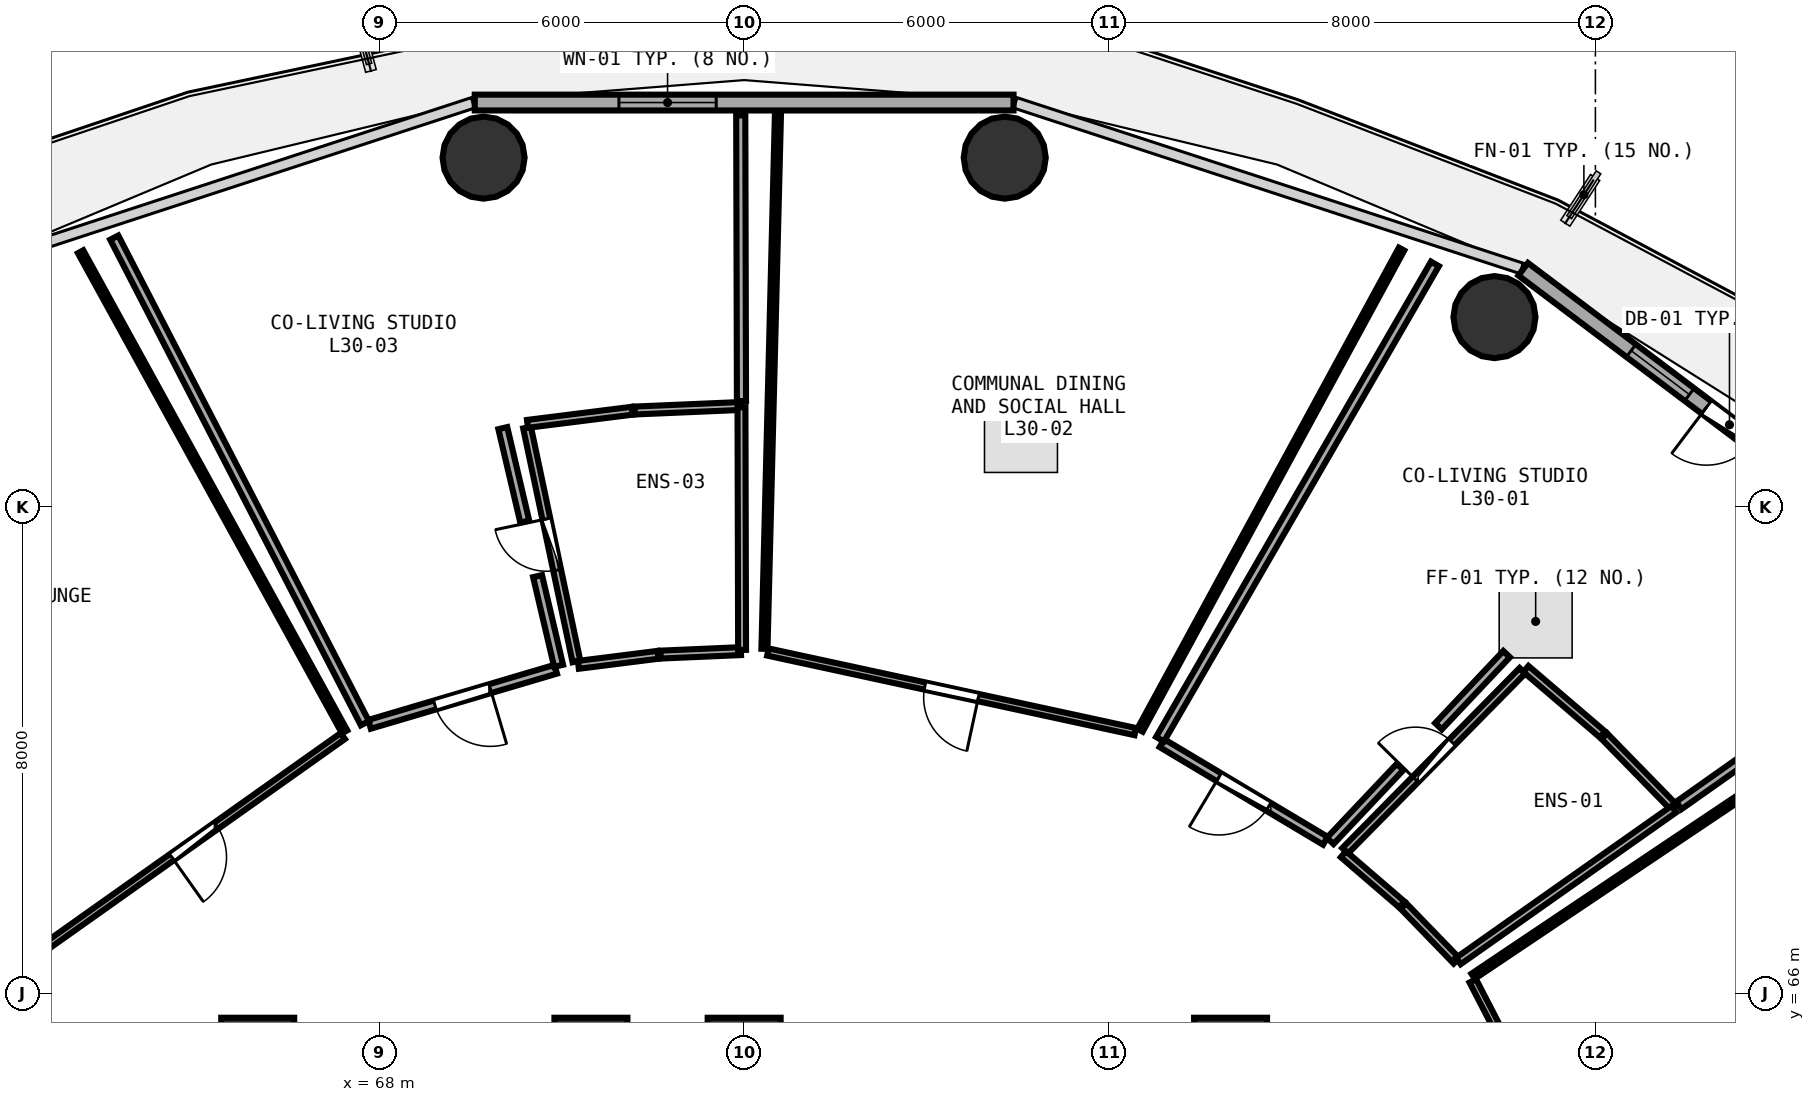
"""IFC4 building model, lengths in metres.
Left out: names, types, materials, properties, quantities, classifications, styles, units other than length and angle.
Written with IfcOpenShell. Run it as: python <this file> out.ifc"""

import sys

from ifc_helpers import new_model, si_unit, direction, frame, frame_2d, origin, origin_2d, place, context, subcontext, project, spatial, rectangle, circle, extrude, element, fill, save


model = new_model("IFC4")
c1 = context("Model", 3, precision=1e-05, world=origin(), true_north=direction((0.0, 1.0)))
c2 = subcontext(c1, "Body", "Model", "MODEL_VIEW")
j1 = project(units=[si_unit("LENGTHUNIT", "METRE"), si_unit("PLANEANGLEUNIT", "RADIAN")], contexts=[c1])
p1 = place(None, origin())
s1 = spatial("IfcSite", under=j1, at=p1, CompositionType="ELEMENT")
p2 = place(p1, origin())
s2 = spatial("IfcBuilding", under=s1, at=p2, CompositionType="ELEMENT")
p3 = place(p2, frame((0.0, 0.0, 117.6)))
s3 = spatial("IfcBuildingStorey", under=s2, at=p3, CompositionType="ELEMENT", Elevation=117.6)
for number, where, z_axis, x_axis in (
    (1, (82.0, 65.0, 0.0), (0.0, 0.0, 1.0), (1.0, 0.0, 0.0)),
    (2, (74.0, 65.0, 0.0), (0.0, 0.0, 1.0), (1.0, 0.0, 0.0)),
    (3, (71.48, 65.0, 0.0), (0.0, 0.0, 1.0), (1.0, 0.0, 0.0)),
    (4, (66.0, 65.0, 0.0), (0.0, 0.0, 1.0), (1.0, 0.0, 0.0)),
):
    element("IfcColumn", number, at=place(p3, frame(where, z_axis=z_axis, x_axis=x_axis)), inside=s3, PredefinedType="PILASTER", context=c2, shape_type="SweptSolid", body=[
        extrude(rectangle(XDim=1.2, YDim=1.2, at=origin_2d()), origin(), (0.0, 0.0, 1.0), 3.75),
    ])
for number, where, z_axis, x_axis in (
    (5, (86.34, 77.122, 0.0), (0.0, 0.0, 1.0), (1.0, 0.0, 0.0)),
    (6, (78.286, 79.745, 0.0), (0.0, 0.0, 1.0), (1.0, 0.0, 0.0)),
    (7, (69.714, 79.745, 0.0), (0.0, 0.0, 1.0), (1.0, 0.0, 0.0)),
):
    element("IfcColumn", number, at=place(p3, frame(where, z_axis=z_axis, x_axis=x_axis)), inside=s3, PredefinedType="COLUMN", context=c2, shape_type="SweptSolid", body=[
        extrude(circle(Radius=0.675, at=origin_2d()), origin(), (0.0, 0.0, 1.0), 3.75),
    ])
p4 = place(p3, frame((93.599, 72.793, 0.0), z_axis=(0.0, 0.0, 1.0), x_axis=(-0.798501507879, 0.601992808857, 0.0)))
e8 = element("IfcWall", 8, at=p4, inside=s3, PredefinedType="SOLIDWALL", context=c2, shape_type="SweptSolid", body=[
    extrude(rectangle(XDim=8.499, YDim=0.26, at=frame_2d((4.25, 0.0))), origin(), (0.0, 0.0, 1.0), 3.475),
])
p5 = place(p4, frame((3.775, 0.0, 0.0)))
e9 = element("IfcOpeningElement", 9, at=p5, cuts=e8, PredefinedType="OPENING", context=c2, shape_type="SweptSolid", body=[
    extrude(rectangle(XDim=0.95, YDim=2.1, at=frame_2d((0.475, 1.05))), frame((0.0, 0.14, 0.0), z_axis=(0.0, -1.0, 0.0), x_axis=(1.0, 0.0, 0.0)), (0.0, 0.0, 1.0), 0.28),
])
p6 = place(p4, frame((5.075, 0.0, 0.85)))
e10 = element("IfcOpeningElement", 10, at=p6, cuts=e8, PredefinedType="OPENING", context=c2, shape_type="SweptSolid", body=[
    extrude(rectangle(XDim=1.2, YDim=1.45, at=frame_2d((0.6, 0.725))), frame((0.0, 0.14, 0.0), z_axis=(0.0, -1.0, 0.0), x_axis=(1.0, 0.0, 0.0)), (0.0, 0.0, 1.0), 0.28),
])
p7 = place(p3, frame((78.43, 80.651, 0.0), z_axis=(0.0, 0.0, 1.0), x_axis=(-1.0, 0.0, 0.0)))
e11 = element("IfcWall", 11, at=p7, inside=s3, PredefinedType="SOLIDWALL", context=c2, shape_type="SweptSolid", body=[
    extrude(rectangle(XDim=8.861, YDim=0.26, at=frame_2d((4.43, 0.0))), origin(), (0.0, 0.0, 1.0), 3.475),
])
p8 = place(p7, frame((4.89, 0.0, 0.85)))
e12 = element("IfcOpeningElement", 12, at=p8, cuts=e11, PredefinedType="OPENING", context=c2, shape_type="SweptSolid", body=[
    extrude(rectangle(XDim=1.6, YDim=1.45, at=frame_2d((0.8, 0.725))), frame((0.0, 0.14, 0.0), z_axis=(0.0, -1.0, 0.0), x_axis=(1.0, 0.0, 0.0)), (0.0, 0.0, 1.0), 0.28),
])
p9 = place(p3, frame((83.883, 68.345, 0.0), z_axis=(0.0, 0.0, 1.0), x_axis=(0.70168270288, 0.712489567979, 0.0)))
e13 = element("IfcWall", 13, at=p9, inside=s3, PredefinedType="PLUMBINGWALL", context=c2, shape_type="SweptSolid", body=[
    extrude(rectangle(XDim=4.157, YDim=0.13, at=frame_2d((2.078, 0.0))), origin(), (0.0, 0.0, 1.0), 3.175),
])
p10 = place(p9, frame((1.648, 0.0, 0.0)))
e14 = element("IfcOpeningElement", 14, at=p10, cuts=e13, PredefinedType="OPENING", context=c2, shape_type="SweptSolid", body=[
    extrude(rectangle(XDim=0.86, YDim=2.05, at=frame_2d((0.43, 1.025))), frame((0.0, 0.075, 0.0), z_axis=(0.0, -1.0, 0.0), x_axis=(1.0, 0.0, 0.0)), (0.0, 0.0, 1.0), 0.15),
])
p11 = place(p3, frame((83.56, 68.51, 0.0), z_axis=(0.0, 0.0, 1.0), x_axis=(-0.858523244826, 0.512774646501, 0.0)))
e15 = element("IfcWall", 15, at=p11, inside=s3, PredefinedType="PARTITIONING", context=c2, shape_type="SweptSolid", body=[
    extrude(rectangle(XDim=3.131, YDim=0.15, at=frame_2d((1.565, 0.0))), origin(), (0.0, 0.0, 1.0), 2.925),
])
p12 = place(p11, frame((1.09, 0.0, 0.0)))
e16 = element("IfcOpeningElement", 16, at=p12, cuts=e15, PredefinedType="OPENING", context=c2, shape_type="SweptSolid", body=[
    extrude(rectangle(XDim=0.95, YDim=2.08, at=frame_2d((0.475, 1.04))), frame((0.0, 0.085, 0.0), z_axis=(0.0, -1.0, 0.0), x_axis=(1.0, 0.0, 0.0)), (0.0, 0.0, 1.0), 0.17),
])
p13 = place(p3, frame((80.432, 70.306, 0.0), z_axis=(0.0, 0.0, 1.0), x_axis=(-0.977331177519, 0.211716247484, 0.0)))
e17 = element("IfcWall", 17, at=p13, inside=s3, PredefinedType="PARTITIONING", context=c2, shape_type="SweptSolid", body=[
    extrude(rectangle(XDim=6.181, YDim=0.12, at=frame_2d((3.09, 0.0))), origin(), (0.0, 0.0, 1.0), 3.235),
])
p14 = place(p13, frame((2.64, 0.0, 0.0)))
e18 = element("IfcOpeningElement", 18, at=p14, cuts=e17, PredefinedType="OPENING", context=c2, shape_type="SweptSolid", body=[
    extrude(rectangle(XDim=0.9, YDim=2.08, at=frame_2d((0.45, 1.04))), frame((0.0, 0.07, 0.0), z_axis=(0.0, -1.0, 0.0), x_axis=(1.0, 0.0, 0.0)), (0.0, 0.0, 1.0), 0.14),
])
p15 = place(p3, frame((71.242, 71.46, 0.0), z_axis=(0.0, 0.0, 1.0), x_axis=(-0.206652168131, 0.97841447322, 0.0)))
e19 = element("IfcWall", 19, at=p15, inside=s3, PredefinedType="PLUMBINGWALL", context=c2, shape_type="SweptSolid", body=[
    extrude(rectangle(XDim=3.931, YDim=0.13, at=frame_2d((1.965, 0.0))), origin(), (0.0, 0.0, 1.0), 2.925),
])
p16 = place(p15, frame((1.535, 0.0, 0.0)))
e20 = element("IfcOpeningElement", 20, at=p16, cuts=e19, PredefinedType="OPENING", context=c2, shape_type="SweptSolid", body=[
    extrude(rectangle(XDim=0.86, YDim=2.05, at=frame_2d((0.43, 1.025))), frame((0.0, 0.075, 0.0), z_axis=(0.0, -1.0, 0.0), x_axis=(1.0, 0.0, 0.0)), (0.0, 0.0, 1.0), 0.15),
])
p17 = place(p3, frame((70.9, 71.331, 0.0), z_axis=(0.0, 0.0, 1.0), x_axis=(-0.958905255717, -0.283726471373, 0.0)))
e21 = element("IfcWall", 21, at=p17, inside=s3, PredefinedType="PARTITIONING", context=c2, shape_type="SweptSolid", body=[
    extrude(rectangle(XDim=3.193, YDim=0.15, at=frame_2d((1.597, 0.0))), origin(), (0.0, 0.0, 1.0), 2.925),
])
p18 = place(p17, frame((1.122, 0.0, 0.0)))
e22 = element("IfcOpeningElement", 22, at=p18, cuts=e21, PredefinedType="OPENING", context=c2, shape_type="SweptSolid", body=[
    extrude(rectangle(XDim=0.95, YDim=2.08, at=frame_2d((0.475, 1.04))), frame((0.0, 0.085, 0.0), z_axis=(0.0, -1.0, 0.0), x_axis=(1.0, 0.0, 0.0)), (0.0, 0.0, 1.0), 0.17),
])
p19 = place(p3, frame((67.399, 70.232, 0.0), z_axis=(0.0, 0.0, 1.0), x_axis=(-0.815932399176, -0.578147316846, 0.0)))
e23 = element("IfcWall", 23, at=p19, inside=s3, PredefinedType="PARTITIONING", context=c2, shape_type="SweptSolid", body=[
    extrude(rectangle(XDim=5.993, YDim=0.12, at=frame_2d((2.997, 0.0))), origin(), (0.0, 0.0, 1.0), 2.925),
])
p20 = place(p19, frame((2.546, 0.0, 0.0)))
e24 = element("IfcOpeningElement", 24, at=p20, cuts=e23, PredefinedType="OPENING", context=c2, shape_type="SweptSolid", body=[
    extrude(rectangle(XDim=0.9, YDim=2.08, at=frame_2d((0.45, 1.04))), frame((0.0, 0.07, 0.0), z_axis=(0.0, -1.0, 0.0), x_axis=(1.0, 0.0, 0.0)), (0.0, 0.0, 1.0), 0.14),
])
p21 = place(p3, frame((88.618, 61.116, 0.0), z_axis=(0.0, 0.0, 1.0), x_axis=(-0.459658120373, 0.88809594773, 0.0)))
e25 = element("IfcWall", 25, at=p21, inside=s3, PredefinedType="PARTITIONING", context=c2, shape_type="SweptSolid", body=[
    extrude(rectangle(XDim=5.732, YDim=0.12, at=frame_2d((2.866, 0.0))), origin(), (0.0, 0.0, 1.0), 2.925),
])
p22 = place(p21, frame((2.416, 0.0, 0.0)))
e26 = element("IfcOpeningElement", 26, at=p22, cuts=e25, PredefinedType="OPENING", context=c2, shape_type="SweptSolid", body=[
    extrude(rectangle(XDim=0.9, YDim=2.08, at=frame_2d((0.45, 1.04))), frame((0.0, 0.07, 0.0), z_axis=(0.0, -1.0, 0.0), x_axis=(1.0, 0.0, 0.0)), (0.0, 0.0, 1.0), 0.14),
])
p23 = place(p3, frame((85.716, 66.536, 0.0), z_axis=(0.0, 0.0, 1.0), x_axis=(-0.695817197704, 0.718218927194, 0.0)))
e27 = element("IfcWall", 27, at=p23, inside=s3, PredefinedType="PLUMBINGWALL", context=c2, shape_type="SweptSolid", body=[
    extrude(rectangle(XDim=1.253, YDim=0.13, at=frame_2d((0.627, 0.0))), origin(), (0.0, 0.0, 1.0), 2.925),
])
p24 = place(p3, frame((84.815, 67.464, 0.0), z_axis=(0.0, 0.0, 1.0), x_axis=(-0.757933178543, 0.652332198242, 0.0)))
e28 = element("IfcWall", 28, at=p24, inside=s3, PredefinedType="PLUMBINGWALL", context=c2, shape_type="SweptSolid", body=[
    extrude(rectangle(XDim=1.265, YDim=0.13, at=frame_2d((0.632, 0.0))), origin(), (0.0, 0.0, 1.0), 3.48),
])
p25 = place(p3, frame((86.857, 71.336, 0.0), z_axis=(0.0, 0.0, 1.0), x_axis=(0.760056789813, -0.649856658241, 0.0)))
e29 = element("IfcWall", 29, at=p25, inside=s3, PredefinedType="PLUMBINGWALL", context=c2, shape_type="SweptSolid", body=[
    extrude(rectangle(XDim=1.657, YDim=0.13, at=frame_2d((0.829, 0.0))), origin(), (0.0, 0.0, 1.0), 3.48),
])
p26 = place(p3, frame((88.146, 70.232, 0.0), z_axis=(0.0, 0.0, 1.0), x_axis=(0.698431593966, -0.715676818508, 0.0)))
e30 = element("IfcWall", 30, at=p26, inside=s3, PredefinedType="PLUMBINGWALL", context=c2, shape_type="SweptSolid", body=[
    extrude(rectangle(XDim=1.642, YDim=0.13, at=frame_2d((0.821, 0.0))), origin(), (0.0, 0.0, 1.0), 2.925),
])
p27 = place(p3, frame((89.291, 69.031, 0.0), z_axis=(0.0, 0.0, 1.0), x_axis=(-0.817498099131, -0.575931296178, 0.0)))
e31 = element("IfcWall", 31, at=p27, inside=s3, PredefinedType="PLUMBINGWALL", context=c2, shape_type="SweptSolid", body=[
    extrude(rectangle(XDim=4.336, YDim=0.13, at=frame_2d((2.168, 0.0))), origin(), (0.0, 0.0, 1.0), 3.175),
])
p28 = place(p3, frame((80.84, 70.181, 0.0), z_axis=(0.0, 0.0, 1.0), x_axis=(0.500668535271, 0.865639080558, 0.0)))
e32 = element("IfcWall", 32, at=p28, inside=s3, PredefinedType="PARTITIONING", context=c2, shape_type="SweptSolid", body=[
    extrude(rectangle(XDim=9.03, YDim=0.15, at=frame_2d((4.515, 0.0))), origin(), (0.0, 0.0, 1.0), 2.925),
])
p29 = place(p3, frame((92.79, 71.502, 0.0), z_axis=(0.0, 0.0, 1.0), x_axis=(-0.817102044885, -0.576493060015, 0.0)))
e33 = element("IfcWall", 33, at=p29, inside=s3, PredefinedType="PARTITIONING", context=c2, shape_type="SweptSolid", body=[
    extrude(rectangle(XDim=4.185, YDim=0.15, at=frame_2d((2.092, 0.0))), origin(), (0.0, 0.0, 1.0), 3.235),
])
p30 = place(p3, frame((86.54, 71.58, 0.0), z_axis=(0.0, 0.0, 1.0), x_axis=(-0.68661474407, -0.727021453071, 0.0)))
e34 = element("IfcWall", 34, at=p30, inside=s3, PredefinedType="PARTITIONING", context=c2, shape_type="SweptSolid", body=[
    extrude(rectangle(XDim=1.631, YDim=0.15, at=frame_2d((0.816, 0.0))), origin(), (0.0, 0.0, 1.0), 3.175),
])
p31 = place(p3, frame((84.788, 69.725, 0.0), z_axis=(0.0, 0.0, 1.0), x_axis=(-0.686614966265, -0.727021243226, 0.0)))
e35 = element("IfcWall", 35, at=p31, inside=s3, PredefinedType="PARTITIONING", context=c2, shape_type="SweptSolid", body=[
    extrude(rectangle(XDim=1.674, YDim=0.15, at=frame_2d((0.837, 0.0))), origin(), (0.0, 0.0, 1.0), 3.235),
])
p32 = place(p3, frame((74.334, 71.667, 0.0), z_axis=(0.0, 0.0, 1.0), x_axis=(0.025193894125, 0.999682583473, 0.0)))
e36 = element("IfcWall", 36, at=p32, inside=s3, PredefinedType="PARTITIONING", context=c2, shape_type="SweptSolid", body=[
    extrude(rectangle(XDim=8.77, YDim=0.1, at=frame_2d((4.385, 0.0))), origin(), (0.0, 0.0, 1.0), 2.975),
])
p33 = place(p3, frame((84.812, 78.241, 0.0), z_axis=(0.0, 0.0, 1.0), x_axis=(-0.477645693392, -0.878552554822, 0.0)))
e37 = element("IfcWall", 37, at=p33, inside=s3, PredefinedType="PARTITIONING", context=c2, shape_type="SweptSolid", body=[
    extrude(rectangle(XDim=9.007, YDim=0.1, at=frame_2d((4.503, 0.0))), origin(), (0.0, 0.0, 1.0), 2.925),
])
p34 = place(p3, frame((73.946, 71.629, 0.0), z_axis=(0.0, 0.0, 1.0), x_axis=(-0.999067611154, -0.043173004803, 0.0)))
e38 = element("IfcWall", 38, at=p34, inside=s3, PredefinedType="PLUMBINGWALL", context=c2, shape_type="SweptSolid", body=[
    extrude(rectangle(XDim=1.323, YDim=0.13, at=frame_2d((0.662, 0.0))), origin(), (0.0, 0.0, 1.0), 3.48),
])
p35 = place(p3, frame((72.584, 71.569, 0.0), z_axis=(0.0, 0.0, 1.0), x_axis=(-0.992163718395, -0.124944611333, 0.0)))
e39 = element("IfcWall", 39, at=p35, inside=s3, PredefinedType="PLUMBINGWALL", context=c2, shape_type="SweptSolid", body=[
    extrude(rectangle(XDim=1.321, YDim=0.13, at=frame_2d((0.66, 0.0))), origin(), (0.0, 0.0, 1.0), 3.48),
])
p36 = place(p3, frame((70.437, 75.366, 0.0), z_axis=(0.0, 0.0, 1.0), x_axis=(0.992223689582, 0.124467464958, 0.0)))
e40 = element("IfcWall", 40, at=p36, inside=s3, PredefinedType="PLUMBINGWALL", context=c2, shape_type="SweptSolid", body=[
    extrude(rectangle(XDim=1.736, YDim=0.13, at=frame_2d((0.868, 0.0))), origin(), (0.0, 0.0, 1.0), 2.925),
])
p37 = place(p3, frame((72.199, 75.586, 0.0), z_axis=(0.0, 0.0, 1.0), x_axis=(0.999088465239, 0.04268768706, 0.0)))
e41 = element("IfcWall", 41, at=p37, inside=s3, PredefinedType="PLUMBINGWALL", context=c2, shape_type="SweptSolid", body=[
    extrude(rectangle(XDim=1.739, YDim=0.13, at=frame_2d((0.869, 0.0))), origin(), (0.0, 0.0, 1.0), 3.48),
])
p38 = place(p3, frame((73.956, 75.641, 0.0), z_axis=(0.0, 0.0, 1.0), x_axis=(0.002507944156, -0.999996855103, 0.0)))
e42 = element("IfcWall", 42, at=p38, inside=s3, PredefinedType="PLUMBINGWALL", context=c2, shape_type="SweptSolid", body=[
    extrude(rectangle(XDim=3.991, YDim=0.13, at=frame_2d((1.996, 0.0))), origin(), (0.0, 0.0, 1.0), 3.175),
])
p39 = place(p3, frame((67.763, 70.444, 0.0), z_axis=(0.0, 0.0, 1.0), x_axis=(-0.458694817529, 0.888593869196, 0.0)))
e43 = element("IfcWall", 43, at=p39, inside=s3, PredefinedType="PARTITIONING", context=c2, shape_type="SweptSolid", body=[
    extrude(rectangle(XDim=8.987, YDim=0.15, at=frame_2d((4.494, 0.0))), origin(), (0.0, 0.0, 1.0), 2.975),
])
p40 = place(p3, frame((73.944, 80.44, 0.0), z_axis=(0.0, 0.0, 1.0), x_axis=(0.002493887397, -0.999996890258, 0.0)))
e44 = element("IfcWall", 44, at=p40, inside=s3, PredefinedType="PARTITIONING", context=c2, shape_type="SweptSolid", body=[
    extrude(rectangle(XDim=4.699, YDim=0.15, at=frame_2d((2.35, 0.0))), origin(), (0.0, 0.0, 1.0), 2.975),
])
p41 = place(p3, frame((70.031, 75.296, 0.0), z_axis=(0.0, 0.0, 1.0), x_axis=(0.228651551475, -0.973508329707, 0.0)))
e45 = element("IfcWall", 45, at=p41, inside=s3, PredefinedType="PARTITIONING", context=c2, shape_type="SweptSolid", body=[
    extrude(rectangle(XDim=1.579, YDim=0.15, at=frame_2d((0.79, 0.0))), origin(), (0.0, 0.0, 1.0), 2.925),
])
p42 = place(p3, frame((70.602, 72.863, 0.0), z_axis=(0.0, 0.0, 1.0), x_axis=(0.228680272693, -0.973501583399, 0.0)))
e46 = element("IfcWall", 46, at=p42, inside=s3, PredefinedType="PARTITIONING", context=c2, shape_type="SweptSolid", body=[
    extrude(rectangle(XDim=1.516, YDim=0.15, at=frame_2d((0.758, 0.0))), origin(), (0.0, 0.0, 1.0), 2.925),
])
p43 = place(p3, frame((63.087, 78.197, 0.0), z_axis=(0.0, 0.0, 1.0), x_axis=(0.481837612944, -0.876260529039, 0.0)))
e47 = element("IfcWall", 47, at=p43, inside=s3, PredefinedType="PARTITIONING", context=c2, shape_type="SweptSolid", body=[
    extrude(rectangle(XDim=9.01, YDim=0.1, at=frame_2d((4.505, 0.0))), origin(), (0.0, 0.0, 1.0), 2.975),
])
p44 = place(p3, frame((85.989, 66.282, 0.0), z_axis=(0.0, 0.0, 1.0), x_axis=(0.830433607217, 0.557117603388, 0.0)))
e48 = element("IfcWall", 48, at=p44, inside=s3, PredefinedType="PARTITIONING", context=c2, shape_type="SweptSolid", body=[
    extrude(rectangle(XDim=9.546, YDim=0.1, at=frame_2d((4.773, 0.0))), origin(), (0.0, 0.0, 1.0), 2.975),
])
p45 = place(p5, frame((0.95, 0.0, 0.0), z_axis=(0.0, 0.0, 1.0), x_axis=(-1.0, 0.0, 0.0)))
e49 = element("IfcDoor", 49, at=p45, inside=s3, OperationType="SINGLE_SWING_LEFT", PredefinedType="DOOR", context=c2, shape_type="SweptSolid", body=[
    extrude(rectangle(XDim=0.95, YDim=2.1, at=frame_2d((0.475, 1.05))), frame((0.0, 0.025, 0.0), z_axis=(0.0, -1.0, 0.0), x_axis=(1.0, 0.0, 0.0)), (0.0, 0.0, 1.0), 0.05),
])
fill(e9, e49)
p46 = place(p6, origin())
e50 = element("IfcWindow", 50, at=p46, inside=s3, PartitioningType="SINGLE_PANEL", PredefinedType="WINDOW", context=c2, shape_type="SweptSolid", body=[
    extrude(rectangle(XDim=1.2, YDim=1.45, at=frame_2d((0.6, 0.725))), frame((0.0, 0.03, 0.0), z_axis=(0.0, -1.0, 0.0), x_axis=(1.0, 0.0, 0.0)), (0.0, 0.0, 1.0), 0.06),
])
fill(e10, e50)
p47 = place(p8, origin())
e51 = element("IfcWindow", 51, at=p47, inside=s3, PartitioningType="SINGLE_PANEL", PredefinedType="WINDOW", context=c2, shape_type="SweptSolid", body=[
    extrude(rectangle(XDim=1.6, YDim=1.45, at=frame_2d((0.8, 0.725))), frame((0.0, 0.03, 0.0), z_axis=(0.0, -1.0, 0.0), x_axis=(1.0, 0.0, 0.0)), (0.0, 0.0, 1.0), 0.06),
])
fill(e12, e51)
p48 = place(p10, origin())
e52 = element("IfcDoor", 52, at=p48, inside=s3, OperationType="SINGLE_SWING_LEFT", PredefinedType="DOOR", context=c2, shape_type="SweptSolid", body=[
    extrude(rectangle(XDim=0.86, YDim=2.05, at=frame_2d((0.43, 1.025))), frame((0.0, 0.025, 0.0), z_axis=(0.0, -1.0, 0.0), x_axis=(1.0, 0.0, 0.0)), (0.0, 0.0, 1.0), 0.05),
])
fill(e14, e52)
p49 = place(p12, origin())
e53 = element("IfcDoor", 53, at=p49, inside=s3, OperationType="SINGLE_SWING_RIGHT", PredefinedType="DOOR", context=c2, shape_type="SweptSolid", body=[
    extrude(rectangle(XDim=0.95, YDim=2.08, at=frame_2d((0.475, 1.04))), frame((0.0, 0.025, 0.0), z_axis=(0.0, -1.0, 0.0), x_axis=(1.0, 0.0, 0.0)), (0.0, 0.0, 1.0), 0.05),
])
fill(e16, e53)
p50 = place(p14, origin())
e54 = element("IfcDoor", 54, at=p50, inside=s3, OperationType="SINGLE_SWING_LEFT", PredefinedType="DOOR", context=c2, shape_type="SweptSolid", body=[
    extrude(rectangle(XDim=0.9, YDim=2.08, at=frame_2d((0.45, 1.04))), frame((0.0, 0.025, 0.0), z_axis=(0.0, -1.0, 0.0), x_axis=(1.0, 0.0, 0.0)), (0.0, 0.0, 1.0), 0.05),
])
fill(e18, e54)
p51 = place(p16, origin())
e55 = element("IfcDoor", 55, at=p51, inside=s3, OperationType="SINGLE_SWING_RIGHT", PredefinedType="DOOR", context=c2, shape_type="SweptSolid", body=[
    extrude(rectangle(XDim=0.86, YDim=2.05, at=frame_2d((0.43, 1.025))), frame((0.0, 0.025, 0.0), z_axis=(0.0, -1.0, 0.0), x_axis=(1.0, 0.0, 0.0)), (0.0, 0.0, 1.0), 0.05),
])
fill(e20, e55)
p52 = place(p18, origin())
e56 = element("IfcDoor", 56, at=p52, inside=s3, OperationType="SINGLE_SWING_LEFT", PredefinedType="DOOR", context=c2, shape_type="SweptSolid", body=[
    extrude(rectangle(XDim=0.95, YDim=2.08, at=frame_2d((0.475, 1.04))), frame((0.0, 0.025, 0.0), z_axis=(0.0, -1.0, 0.0), x_axis=(1.0, 0.0, 0.0)), (0.0, 0.0, 1.0), 0.05),
])
fill(e22, e56)
p53 = place(p20, origin())
e57 = element("IfcDoor", 57, at=p53, inside=s3, OperationType="SINGLE_SWING_RIGHT", PredefinedType="DOOR", context=c2, shape_type="SweptSolid", body=[
    extrude(rectangle(XDim=0.9, YDim=2.08, at=frame_2d((0.45, 1.04))), frame((0.0, 0.025, 0.0), z_axis=(0.0, -1.0, 0.0), x_axis=(1.0, 0.0, 0.0)), (0.0, 0.0, 1.0), 0.05),
])
fill(e24, e57)
save(model, sys.argv[1])
